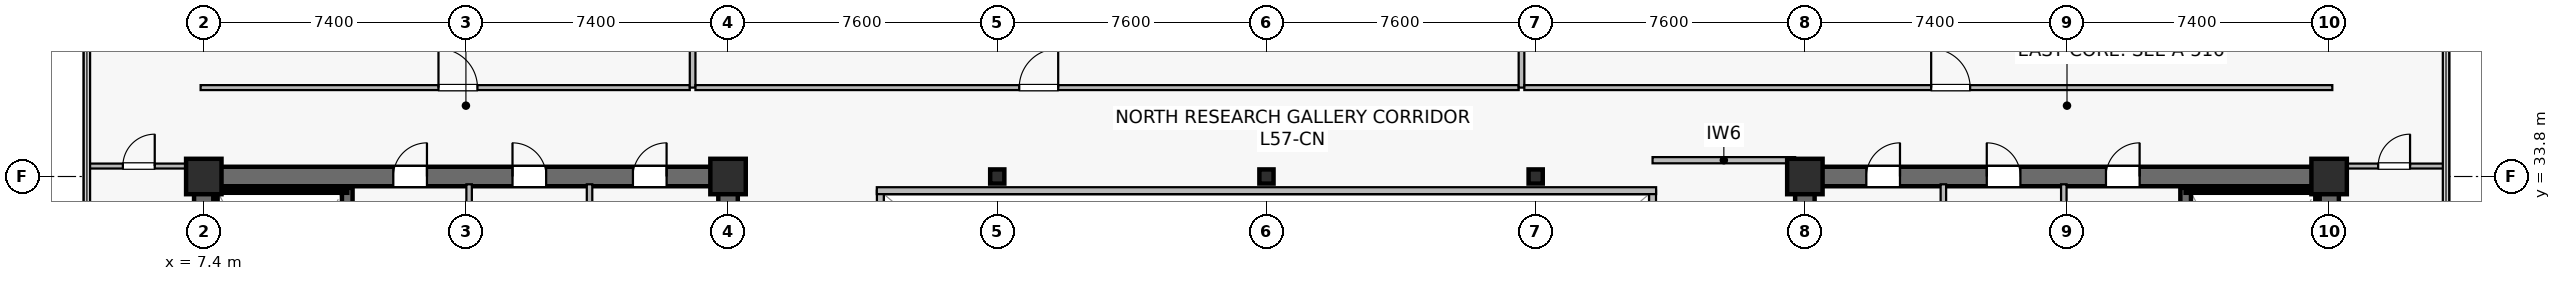
"""IFC4 building model, lengths in metres.
Left out: names, types, materials, properties, quantities, classifications, styles, units other than length and angle.
Written with IfcOpenShell. Run it as: python <this file> out.ifc"""

import sys

from ifc_helpers import new_model, si_unit, direction, frame, frame_2d, origin, origin_2d, place, context, subcontext, project, spatial, rectangle, hollow_rectangle, extrude, source, transform, mapped, element, fill, save


model = new_model("IFC4")
c1 = context("Model", 3, precision=1e-05, world=origin(), true_north=direction((0.0, 1.0)))
c2 = subcontext(c1, "Body", "Model", "MODEL_VIEW")
j1 = project(units=[si_unit("LENGTHUNIT", "METRE"), si_unit("PLANEANGLEUNIT", "RADIAN")], contexts=[c1])
p1 = place(None, origin())
s1 = spatial("IfcSite", under=j1, at=p1, CompositionType="ELEMENT")
p2 = place(p1, origin())
s2 = spatial("IfcBuilding", under=s1, at=p2, CompositionType="ELEMENT")
p3 = place(p2, frame((0.0, 0.0, 238.3)))
s3 = spatial("IfcBuildingStorey", under=s2, at=p3, CompositionType="ELEMENT", Elevation=238.3)
p4 = place(p3, frame((7.125, 33.8, 0.0), z_axis=(0.0, 0.0, 1.0), x_axis=(1.0, 0.0, 0.0)))
e1 = element("IfcWall", 1, at=p4, inside=s3, PredefinedType="SHEAR", context=c2, shape_type="SweptSolid", body=[
    extrude(rectangle(XDim=15.35, YDim=0.55, at=frame_2d((7.675, 0.0))), origin(), (0.0, 0.0, 1.0), 3.8),
])
p5 = place(p4, frame((5.625, 0.0, 0.0)))
e2 = element("IfcOpeningElement", 2, at=p5, cuts=e1, PredefinedType="OPENING", context=c2, shape_type="SweptSolid", body=[
    extrude(rectangle(XDim=0.95, YDim=2.15, at=frame_2d((0.475, 1.075))), frame((0.0, 0.285, 0.0), z_axis=(0.0, -1.0, 0.0), x_axis=(1.0, 0.0, 0.0)), (0.0, 0.0, 1.0), 0.57),
])
p6 = place(p4, frame((8.99, 0.0, 0.0)))
e3 = element("IfcOpeningElement", 3, at=p6, cuts=e1, PredefinedType="OPENING", context=c2, shape_type="SweptSolid", body=[
    extrude(rectangle(XDim=0.95, YDim=2.15, at=frame_2d((0.475, 1.075))), frame((0.0, 0.285, 0.0), z_axis=(0.0, -1.0, 0.0), x_axis=(1.0, 0.0, 0.0)), (0.0, 0.0, 1.0), 0.57),
])
p7 = place(p4, frame((12.39, 0.0, 0.0)))
e4 = element("IfcOpeningElement", 4, at=p7, cuts=e1, PredefinedType="OPENING", context=c2, shape_type="SweptSolid", body=[
    extrude(rectangle(XDim=0.95, YDim=2.15, at=frame_2d((0.475, 1.075))), frame((0.0, 0.285, 0.0), z_axis=(0.0, -1.0, 0.0), x_axis=(1.0, 0.0, 0.0)), (0.0, 0.0, 1.0), 0.57),
])
p8 = place(p3, frame((7.4, 15.075, 0.0), z_axis=(0.0, 0.0, 1.0), x_axis=(0.0, 1.0, 0.0)))
e5 = element("IfcWall", 5, at=p8, inside=s3, PredefinedType="SHEAR", context=c2, shape_type="SweptSolid", body=[
    extrude(rectangle(XDim=18.45, YDim=0.55, at=frame_2d((9.225, 0.0))), origin(), (0.0, 0.0, 1.0), 3.8),
])
p9 = place(p3, frame((22.2, 15.075, 0.0), z_axis=(0.0, 0.0, 1.0), x_axis=(0.0, 1.0, 0.0)))
e6 = element("IfcWall", 6, at=p9, inside=s3, PredefinedType="SHEAR", context=c2, shape_type="SweptSolid", body=[
    extrude(rectangle(XDim=18.45, YDim=0.55, at=frame_2d((9.225, 0.0))), origin(), (0.0, 0.0, 1.0), 3.8),
])
p10 = place(p9, frame((3.475, 0.0, 0.0)))
e7 = element("IfcOpeningElement", 7, at=p10, cuts=e6, PredefinedType="OPENING", context=c2, shape_type="SweptSolid", body=[
    extrude(rectangle(XDim=1.42, YDim=2.2, at=frame_2d((0.71, 1.1))), frame((0.0, 0.285, 0.0), z_axis=(0.0, -1.0, 0.0), x_axis=(1.0, 0.0, 0.0)), (0.0, 0.0, 1.0), 0.57),
])
p11 = place(p3, frame((11.45, 24.85, 0.0), z_axis=(0.0, 0.0, 1.0), x_axis=(0.0, 1.0, 0.0)))
e8 = element("IfcWall", 8, at=p11, inside=s3, PredefinedType="SHEAR", context=c2, shape_type="SweptSolid", body=[
    extrude(rectangle(XDim=8.63, YDim=0.3, at=frame_2d((4.315, 0.0))), origin(), (0.0, 0.0, 1.0), 3.8),
])
p12 = place(p11, frame((0.42, 0.0, 0.0)))
e9 = element("IfcOpeningElement", 9, at=p12, cuts=e8, PredefinedType="OPENING", context=c2, shape_type="SweptSolid", body=[
    extrude(rectangle(XDim=1.1, YDim=2.15, at=frame_2d((0.55, 1.075))), frame((0.0, 0.16, 0.0), z_axis=(0.0, -1.0, 0.0), x_axis=(1.0, 0.0, 0.0)), (0.0, 0.0, 1.0), 0.32),
])
p13 = place(p3, frame((7.73, 33.4, 0.0), z_axis=(0.0, 0.0, 1.0), x_axis=(1.0, 0.0, 0.0)))
e10 = element("IfcWall", 10, at=p13, inside=s3, PredefinedType="SOLIDWALL", context=c2, shape_type="SweptSolid", body=[
    extrude(rectangle(XDim=3.72, YDim=0.12, at=frame_2d((1.86, 0.0))), origin(), (0.0, 0.0, 1.0), 3.8),
])
p14 = place(p3, frame((7.73, 25.0, 0.0), z_axis=(0.0, 0.0, 1.0), x_axis=(0.0, 1.0, 0.0)))
e11 = element("IfcWall", 11, at=p14, inside=s3, PredefinedType="SOLIDWALL", context=c2, shape_type="SweptSolid", body=[
    extrude(rectangle(XDim=8.32, YDim=0.12, at=frame_2d((4.16, 0.0))), origin(), (0.0, 0.0, 1.0), 3.8),
])
p15 = place(p3, frame((52.325, 33.8, 0.0), z_axis=(0.0, 0.0, 1.0), x_axis=(1.0, 0.0, 0.0)))
e12 = element("IfcWall", 12, at=p15, inside=s3, PredefinedType="SHEAR", context=c2, shape_type="SweptSolid", body=[
    extrude(rectangle(XDim=15.35, YDim=0.55, at=frame_2d((7.675, 0.0))), origin(), (0.0, 0.0, 1.0), 3.8),
])
p16 = place(p15, frame((8.775, 0.0, 0.0)))
e13 = element("IfcOpeningElement", 13, at=p16, cuts=e12, PredefinedType="OPENING", context=c2, shape_type="SweptSolid", body=[
    extrude(rectangle(XDim=0.95, YDim=2.15, at=frame_2d((0.475, 1.075))), frame((0.0, 0.285, 0.0), z_axis=(0.0, -1.0, 0.0), x_axis=(1.0, 0.0, 0.0)), (0.0, 0.0, 1.0), 0.57),
])
p17 = place(p15, frame((5.41, 0.0, 0.0)))
e14 = element("IfcOpeningElement", 14, at=p17, cuts=e12, PredefinedType="OPENING", context=c2, shape_type="SweptSolid", body=[
    extrude(rectangle(XDim=0.95, YDim=2.15, at=frame_2d((0.475, 1.075))), frame((0.0, 0.285, 0.0), z_axis=(0.0, -1.0, 0.0), x_axis=(1.0, 0.0, 0.0)), (0.0, 0.0, 1.0), 0.57),
])
p18 = place(p15, frame((2.01, 0.0, 0.0)))
e15 = element("IfcOpeningElement", 15, at=p18, cuts=e12, PredefinedType="OPENING", context=c2, shape_type="SweptSolid", body=[
    extrude(rectangle(XDim=0.95, YDim=2.15, at=frame_2d((0.475, 1.075))), frame((0.0, 0.285, 0.0), z_axis=(0.0, -1.0, 0.0), x_axis=(1.0, 0.0, 0.0)), (0.0, 0.0, 1.0), 0.57),
])
p19 = place(p3, frame((52.6, 15.075, 0.0), z_axis=(0.0, 0.0, 1.0), x_axis=(0.0, 1.0, 0.0)))
e16 = element("IfcWall", 16, at=p19, inside=s3, PredefinedType="SHEAR", context=c2, shape_type="SweptSolid", body=[
    extrude(rectangle(XDim=18.45, YDim=0.55, at=frame_2d((9.225, 0.0))), origin(), (0.0, 0.0, 1.0), 3.8),
])
p20 = place(p19, frame((3.475, 0.0, 0.0)))
e17 = element("IfcOpeningElement", 17, at=p20, cuts=e16, PredefinedType="OPENING", context=c2, shape_type="SweptSolid", body=[
    extrude(rectangle(XDim=1.42, YDim=2.2, at=frame_2d((0.71, 1.1))), frame((0.0, 0.285, 0.0), z_axis=(0.0, -1.0, 0.0), x_axis=(1.0, 0.0, 0.0)), (0.0, 0.0, 1.0), 0.57),
])
p21 = place(p3, frame((67.4, 15.075, 0.0), z_axis=(0.0, 0.0, 1.0), x_axis=(0.0, 1.0, 0.0)))
e18 = element("IfcWall", 18, at=p21, inside=s3, PredefinedType="SHEAR", context=c2, shape_type="SweptSolid", body=[
    extrude(rectangle(XDim=18.45, YDim=0.55, at=frame_2d((9.225, 0.0))), origin(), (0.0, 0.0, 1.0), 3.8),
])
p22 = place(p3, frame((63.35, 24.85, 0.0), z_axis=(0.0, 0.0, 1.0), x_axis=(0.0, 1.0, 0.0)))
e19 = element("IfcWall", 19, at=p22, inside=s3, PredefinedType="SHEAR", context=c2, shape_type="SweptSolid", body=[
    extrude(rectangle(XDim=8.63, YDim=0.3, at=frame_2d((4.315, 0.0))), origin(), (0.0, 0.0, 1.0), 3.8),
])
p23 = place(p22, frame((0.42, 0.0, 0.0)))
e20 = element("IfcOpeningElement", 20, at=p23, cuts=e19, PredefinedType="OPENING", context=c2, shape_type="SweptSolid", body=[
    extrude(rectangle(XDim=1.1, YDim=2.15, at=frame_2d((0.55, 1.075))), frame((0.0, 0.16, 0.0), z_axis=(0.0, -1.0, 0.0), x_axis=(1.0, 0.0, 0.0)), (0.0, 0.0, 1.0), 0.32),
])
p24 = place(p3, frame((63.35, 33.4, 0.0), z_axis=(0.0, 0.0, 1.0), x_axis=(1.0, 0.0, 0.0)))
e21 = element("IfcWall", 21, at=p24, inside=s3, PredefinedType="SOLIDWALL", context=c2, shape_type="SweptSolid", body=[
    extrude(rectangle(XDim=3.72, YDim=0.12, at=frame_2d((1.86, 0.0))), origin(), (0.0, 0.0, 1.0), 3.8),
])
p25 = place(p3, frame((67.07, 25.0, 0.0), z_axis=(0.0, 0.0, 1.0), x_axis=(0.0, 1.0, 0.0)))
e22 = element("IfcWall", 22, at=p25, inside=s3, PredefinedType="SOLIDWALL", context=c2, shape_type="SweptSolid", body=[
    extrude(rectangle(XDim=8.32, YDim=0.12, at=frame_2d((4.16, 0.0))), origin(), (0.0, 0.0, 1.0), 3.8),
])
m1 = source(origin(), c2, "Body", "SweptSolid", [
    extrude(rectangle(XDim=1.0, YDim=1.0, at=origin_2d()), origin(), (0.0, 0.0, 1.0), 4.1),
])
for number, where, z_axis, x_axis in (
    (23, (7.4, 33.8, 0.0), (0.0, 0.0, 1.0), (1.0, 0.0, 0.0)),
    (24, (22.2, 33.8, 0.0), (0.0, 0.0, 1.0), (1.0, 0.0, 0.0)),
    (25, (52.6, 33.8, 0.0), (0.0, 0.0, 1.0), (1.0, 0.0, 0.0)),
    (26, (67.4, 33.8, 0.0), (0.0, 0.0, 1.0), (1.0, 0.0, 0.0)),
):
    element("IfcColumn", number, at=place(p3, frame(where, z_axis=z_axis, x_axis=x_axis)), inside=s3, PredefinedType="COLUMN", context=c2, shape_type="MappedRepresentation", body=[
        mapped(m1, transform((0.0, 0.0, 0.0), scale=1.0)),
    ])
m2 = source(origin(), c2, "Body", "SweptSolid", [
    extrude(hollow_rectangle(XDim=0.4, YDim=0.4, WallThickness=0.019, at=origin_2d()), origin(), (0.0, 0.0, 1.0), 4.1),
])
for number, where, z_axis, x_axis in (
    (27, (29.8, 33.8, 0.0), (0.0, 0.0, 1.0), (1.0, 0.0, 0.0)),
    (28, (37.4, 33.8, 0.0), (0.0, 0.0, 1.0), (1.0, 0.0, 0.0)),
    (29, (45.0, 33.8, 0.0), (0.0, 0.0, 1.0), (1.0, 0.0, 0.0)),
):
    element("IfcColumn", number, at=place(p3, frame(where, z_axis=z_axis, x_axis=x_axis)), inside=s3, PredefinedType="COLUMN", context=c2, shape_type="MappedRepresentation", body=[
        mapped(m2, transform((0.0, 0.0, 0.0), scale=1.0)),
    ])
p26 = place(p3, frame((14.89, 29.65, 0.0), z_axis=(0.0, 0.0, 1.0), x_axis=(0.0, 1.0, 0.0)))
e30 = element("IfcWall", 30, at=p26, inside=s3, PredefinedType="PLUMBINGWALL", context=c2, shape_type="SweptSolid", body=[
    extrude(rectangle(XDim=3.93, YDim=0.155, at=frame_2d((1.965, 0.0))), origin(), (0.0, 0.0, 1.0), 3.197),
])
p27 = place(p3, frame((18.29, 29.65, 0.0), z_axis=(0.0, 0.0, 1.0), x_axis=(0.0, 1.0, 0.0)))
e31 = element("IfcWall", 31, at=p27, inside=s3, PredefinedType="PLUMBINGWALL", context=c2, shape_type="SweptSolid", body=[
    extrude(rectangle(XDim=3.93, YDim=0.155, at=frame_2d((1.965, 0.0))), origin(), (0.0, 0.0, 1.0), 3.8),
])
p28 = place(p3, frame((59.91, 29.65, 0.0), z_axis=(0.0, 0.0, 1.0), x_axis=(0.0, 1.0, 0.0)))
e32 = element("IfcWall", 32, at=p28, inside=s3, PredefinedType="PLUMBINGWALL", context=c2, shape_type="SweptSolid", body=[
    extrude(rectangle(XDim=3.93, YDim=0.155, at=frame_2d((1.965, 0.0))), origin(), (0.0, 0.0, 1.0), 3.197),
])
p29 = place(p3, frame((56.51, 29.65, 0.0), z_axis=(0.0, 0.0, 1.0), x_axis=(0.0, 1.0, 0.0)))
e33 = element("IfcWall", 33, at=p29, inside=s3, PredefinedType="PLUMBINGWALL", context=c2, shape_type="SweptSolid", body=[
    extrude(rectangle(XDim=3.93, YDim=0.155, at=frame_2d((1.965, 0.0))), origin(), (0.0, 0.0, 1.0), 3.8),
])
p30 = place(p3, frame((48.3, 34.26, 0.0), z_axis=(0.0, 0.0, 1.0), x_axis=(1.0, 0.0, 0.0)))
e34 = element("IfcWall", 34, at=p30, inside=s3, PredefinedType="PARTITIONING", context=c2, shape_type="SweptSolid", body=[
    extrude(rectangle(XDim=4.025, YDim=0.175, at=frame_2d((2.012, 0.0))), origin(), (0.0, 0.0, 1.0), 3.485),
])
p31 = place(p3, frame((26.5, 15.2, 0.0), z_axis=(0.0, 0.0, 1.0), x_axis=(0.0, 1.0, 0.0)))
e35 = element("IfcWall", 35, at=p31, inside=s3, PredefinedType="SOLIDWALL", context=c2, shape_type="SweptSolid", body=[
    extrude(rectangle(XDim=18.2, YDim=0.195, at=frame_2d((9.1, 0.0))), origin(), (0.0, 0.0, 1.0), 3.8),
])
p32 = place(p31, frame((1.8, 0.0, 0.9)))
e36 = element("IfcOpeningElement", 36, at=p32, cuts=e35, PredefinedType="OPENING", context=c2, shape_type="SweptSolid", body=[
    extrude(rectangle(XDim=1.2, YDim=1.35, at=frame_2d((0.6, 0.675))), frame((0.0, 0.107, 0.0), z_axis=(0.0, -1.0, 0.0), x_axis=(1.0, 0.0, 0.0)), (0.0, 0.0, 1.0), 0.215),
])
p33 = place(p31, frame((13.2, 0.0, 0.9)))
e37 = element("IfcOpeningElement", 37, at=p33, cuts=e35, PredefinedType="OPENING", context=c2, shape_type="SweptSolid", body=[
    extrude(rectangle(XDim=1.2, YDim=1.35, at=frame_2d((0.6, 0.675))), frame((0.0, 0.107, 0.0), z_axis=(0.0, -1.0, 0.0), x_axis=(1.0, 0.0, 0.0)), (0.0, 0.0, 1.0), 0.215),
])
p34 = place(p3, frame((48.3, 15.2, 0.0), z_axis=(0.0, 0.0, 1.0), x_axis=(0.0, 1.0, 0.0)))
e38 = element("IfcWall", 38, at=p34, inside=s3, PredefinedType="SOLIDWALL", context=c2, shape_type="SweptSolid", body=[
    extrude(rectangle(XDim=18.2, YDim=0.195, at=frame_2d((9.1, 0.0))), origin(), (0.0, 0.0, 1.0), 3.8),
])
p35 = place(p34, frame((1.8, 0.0, 0.9)))
e39 = element("IfcOpeningElement", 39, at=p35, cuts=e38, PredefinedType="OPENING", context=c2, shape_type="SweptSolid", body=[
    extrude(rectangle(XDim=1.2, YDim=1.35, at=frame_2d((0.6, 0.675))), frame((0.0, 0.107, 0.0), z_axis=(0.0, -1.0, 0.0), x_axis=(1.0, 0.0, 0.0)), (0.0, 0.0, 1.0), 0.215),
])
p36 = place(p34, frame((13.2, 0.0, 0.9)))
e40 = element("IfcOpeningElement", 40, at=p36, cuts=e38, PredefinedType="OPENING", context=c2, shape_type="SweptSolid", body=[
    extrude(rectangle(XDim=1.2, YDim=1.35, at=frame_2d((0.6, 0.675))), frame((0.0, 0.107, 0.0), z_axis=(0.0, -1.0, 0.0), x_axis=(1.0, 0.0, 0.0)), (0.0, 0.0, 1.0), 0.215),
])
p37 = place(p3, frame((26.4, 33.4, 0.0), z_axis=(0.0, 0.0, 1.0), x_axis=(1.0, 0.0, 0.0)))
e41 = element("IfcWall", 41, at=p37, inside=s3, PredefinedType="SOLIDWALL", context=c2, shape_type="SweptSolid", body=[
    extrude(rectangle(XDim=22.0, YDim=0.195, at=frame_2d((11.0, 0.0))), origin(), (0.0, 0.0, 1.0), 3.8),
])
p38 = place(p3, frame((7.31, 36.31, 0.0), z_axis=(0.0, 0.0, 1.0), x_axis=(1.0, 0.0, 0.0)))
e42 = element("IfcWall", 42, at=p38, inside=s3, PredefinedType="PARTITIONING", context=c2, shape_type="SweptSolid", body=[
    extrude(rectangle(XDim=13.81, YDim=0.14, at=frame_2d((6.905, 0.0))), origin(), (0.0, 0.0, 1.0), 3.197),
])
p39 = place(p38, frame((6.715, 0.0, 0.0)))
e43 = element("IfcOpeningElement", 43, at=p39, cuts=e42, PredefinedType="OPENING", context=c2, shape_type="SweptSolid", body=[
    extrude(rectangle(XDim=1.1, YDim=2.18, at=frame_2d((0.55, 1.09))), frame((0.0, 0.08, 0.0), z_axis=(0.0, -1.0, 0.0), x_axis=(1.0, 0.0, 0.0)), (0.0, 0.0, 1.0), 0.16),
])
p40 = place(p3, frame((21.2, 36.31, 0.0), z_axis=(0.0, 0.0, 1.0), x_axis=(0.0, 1.0, 0.0)))
e44 = element("IfcWall", 44, at=p40, inside=s3, PredefinedType="PARTITIONING", context=c2, shape_type="SweptSolid", body=[
    extrude(rectangle(XDim=9.58, YDim=0.16, at=frame_2d((4.79, 0.0))), origin(), (0.0, 0.0, 1.0), 3.135),
])
p41 = place(p3, frame((21.28, 36.31, 0.0), z_axis=(0.0, 0.0, 1.0), x_axis=(1.0, 0.0, 0.0)))
e45 = element("IfcWall", 45, at=p41, inside=s3, PredefinedType="PARTITIONING", context=c2, shape_type="SweptSolid", body=[
    extrude(rectangle(XDim=23.24, YDim=0.14, at=frame_2d((11.62, 0.0))), origin(), (0.0, 0.0, 1.0), 3.197),
])
p42 = place(p41, frame((9.14, 0.0, 0.0)))
e46 = element("IfcOpeningElement", 46, at=p42, cuts=e45, PredefinedType="OPENING", context=c2, shape_type="SweptSolid", body=[
    extrude(rectangle(XDim=1.1, YDim=2.18, at=frame_2d((0.55, 1.09))), frame((0.0, 0.08, 0.0), z_axis=(0.0, -1.0, 0.0), x_axis=(1.0, 0.0, 0.0)), (0.0, 0.0, 1.0), 0.16),
])
p43 = place(p3, frame((44.6, 36.31, 0.0), z_axis=(0.0, 0.0, 1.0), x_axis=(0.0, 1.0, 0.0)))
e47 = element("IfcWall", 47, at=p43, inside=s3, PredefinedType="PARTITIONING", context=c2, shape_type="SweptSolid", body=[
    extrude(rectangle(XDim=8.38, YDim=0.16, at=frame_2d((4.19, 0.0))), origin(), (0.0, 0.0, 1.0), 3.135),
])
p44 = place(p3, frame((44.68, 36.31, 0.0), z_axis=(0.0, 0.0, 1.0), x_axis=(1.0, 0.0, 0.0)))
e48 = element("IfcWall", 48, at=p44, inside=s3, PredefinedType="PARTITIONING", context=c2, shape_type="SweptSolid", body=[
    extrude(rectangle(XDim=22.81, YDim=0.14, at=frame_2d((11.405, 0.0))), origin(), (0.0, 0.0, 1.0), 3.197),
])
p45 = place(p44, frame((11.485, 0.0, 0.0)))
e49 = element("IfcOpeningElement", 49, at=p45, cuts=e48, PredefinedType="OPENING", context=c2, shape_type="SweptSolid", body=[
    extrude(rectangle(XDim=1.1, YDim=2.18, at=frame_2d((0.55, 1.09))), frame((0.0, 0.08, 0.0), z_axis=(0.0, -1.0, 0.0), x_axis=(1.0, 0.0, 0.0)), (0.0, 0.0, 1.0), 0.16),
])
p46 = place(p3, frame((4.11, 34.095, 0.0), z_axis=(0.0, 0.0, 1.0), x_axis=(1.0, 0.0, 0.0)))
e50 = element("IfcWall", 50, at=p46, inside=s3, PredefinedType="PARTITIONING", context=c2, shape_type="SweptSolid", body=[
    extrude(rectangle(XDim=2.91, YDim=0.14, at=frame_2d((1.455, 0.0))), origin(), (0.0, 0.0, 1.0), 3.8),
])
p47 = place(p46, frame((1.005, 0.0, 0.0)))
e51 = element("IfcOpeningElement", 51, at=p47, cuts=e50, PredefinedType="OPENING", context=c2, shape_type="SweptSolid", body=[
    extrude(rectangle(XDim=0.9, YDim=2.1, at=frame_2d((0.45, 1.05))), frame((0.0, 0.08, 0.0), z_axis=(0.0, -1.0, 0.0), x_axis=(1.0, 0.0, 0.0)), (0.0, 0.0, 1.0), 0.16),
])
p48 = place(p3, frame((67.78, 34.095, 0.0), z_axis=(0.0, 0.0, 1.0), x_axis=(1.0, 0.0, 0.0)))
e52 = element("IfcWall", 52, at=p48, inside=s3, PredefinedType="PARTITIONING", context=c2, shape_type="SweptSolid", body=[
    extrude(rectangle(XDim=2.91, YDim=0.14, at=frame_2d((1.455, 0.0))), origin(), (0.0, 0.0, 1.0), 3.8),
])
p49 = place(p48, frame((1.005, 0.0, 0.0)))
e53 = element("IfcOpeningElement", 53, at=p49, cuts=e52, PredefinedType="OPENING", context=c2, shape_type="SweptSolid", body=[
    extrude(rectangle(XDim=0.9, YDim=2.1, at=frame_2d((0.45, 1.05))), frame((0.0, 0.08, 0.0), z_axis=(0.0, -1.0, 0.0), x_axis=(1.0, 0.0, 0.0)), (0.0, 0.0, 1.0), 0.16),
])
m3 = source(origin(), c2, "Body", "SweptSolid", [
    extrude(rectangle(XDim=0.95, YDim=2.15, at=frame_2d((0.475, 1.075))), frame((0.0, 0.025, 0.0), z_axis=(0.0, -1.0, 0.0), x_axis=(1.0, 0.0, 0.0)), (0.0, 0.0, 1.0), 0.05),
])
p50 = place(p5, origin())
e54 = element("IfcDoor", 54, at=p50, inside=s3, OperationType="SINGLE_SWING_RIGHT", PredefinedType="DOOR", context=c2, shape_type="MappedRepresentation", body=[
    mapped(m3, transform((0.0, 0.0, 0.0), scale=1.0)),
])
fill(e2, e54)
p51 = place(p6, origin())
e55 = element("IfcDoor", 55, at=p51, inside=s3, OperationType="SINGLE_SWING_LEFT", PredefinedType="DOOR", context=c2, shape_type="MappedRepresentation", body=[
    mapped(m3, transform((0.0, 0.0, 0.0), scale=1.0)),
])
fill(e3, e55)
p52 = place(p7, origin())
e56 = element("IfcDoor", 56, at=p52, inside=s3, OperationType="SINGLE_SWING_RIGHT", PredefinedType="DOOR", context=c2, shape_type="MappedRepresentation", body=[
    mapped(m3, transform((0.0, 0.0, 0.0), scale=1.0)),
])
fill(e4, e56)
p53 = place(p16, origin())
e57 = element("IfcDoor", 57, at=p53, inside=s3, OperationType="SINGLE_SWING_RIGHT", PredefinedType="DOOR", context=c2, shape_type="MappedRepresentation", body=[
    mapped(m3, transform((0.0, 0.0, 0.0), scale=1.0)),
])
fill(e13, e57)
p54 = place(p17, origin())
e58 = element("IfcDoor", 58, at=p54, inside=s3, OperationType="SINGLE_SWING_LEFT", PredefinedType="DOOR", context=c2, shape_type="MappedRepresentation", body=[
    mapped(m3, transform((0.0, 0.0, 0.0), scale=1.0)),
])
fill(e14, e58)
p55 = place(p18, origin())
e59 = element("IfcDoor", 59, at=p55, inside=s3, OperationType="SINGLE_SWING_RIGHT", PredefinedType="DOOR", context=c2, shape_type="MappedRepresentation", body=[
    mapped(m3, transform((0.0, 0.0, 0.0), scale=1.0)),
])
fill(e15, e59)
m4 = source(origin(), c2, "Body", "SweptSolid", [
    extrude(rectangle(XDim=1.1, YDim=2.18, at=frame_2d((0.55, 1.09))), frame((0.0, 0.025, 0.0), z_axis=(0.0, -1.0, 0.0), x_axis=(1.0, 0.0, 0.0)), (0.0, 0.0, 1.0), 0.05),
])
p56 = place(p39, origin())
e60 = element("IfcDoor", 60, at=p56, inside=s3, OperationType="SINGLE_SWING_LEFT", PredefinedType="DOOR", context=c2, shape_type="MappedRepresentation", body=[
    mapped(m4, transform((0.0, 0.0, 0.0), scale=1.0)),
])
fill(e43, e60)
p57 = place(p42, origin())
e61 = element("IfcDoor", 61, at=p57, inside=s3, OperationType="SINGLE_SWING_RIGHT", PredefinedType="DOOR", context=c2, shape_type="MappedRepresentation", body=[
    mapped(m4, transform((0.0, 0.0, 0.0), scale=1.0)),
])
fill(e46, e61)
p58 = place(p45, origin())
e62 = element("IfcDoor", 62, at=p58, inside=s3, OperationType="SINGLE_SWING_LEFT", PredefinedType="DOOR", context=c2, shape_type="MappedRepresentation", body=[
    mapped(m4, transform((0.0, 0.0, 0.0), scale=1.0)),
])
fill(e49, e62)
m5 = source(origin(), c2, "Body", "SweptSolid", [
    extrude(rectangle(XDim=0.9, YDim=2.1, at=frame_2d((0.45, 1.05))), frame((0.0, 0.025, 0.0), z_axis=(0.0, -1.0, 0.0), x_axis=(1.0, 0.0, 0.0)), (0.0, 0.0, 1.0), 0.05),
])
p59 = place(p47, origin())
e63 = element("IfcDoor", 63, at=p59, inside=s3, OperationType="SINGLE_SWING_RIGHT", PredefinedType="DOOR", context=c2, shape_type="MappedRepresentation", body=[
    mapped(m5, transform((0.0, 0.0, 0.0), scale=1.0)),
])
fill(e51, e63)
p60 = place(p49, origin())
e64 = element("IfcDoor", 64, at=p60, inside=s3, OperationType="SINGLE_SWING_RIGHT", PredefinedType="DOOR", context=c2, shape_type="MappedRepresentation", body=[
    mapped(m5, transform((0.0, 0.0, 0.0), scale=1.0)),
])
fill(e53, e64)
save(model, sys.argv[1])
